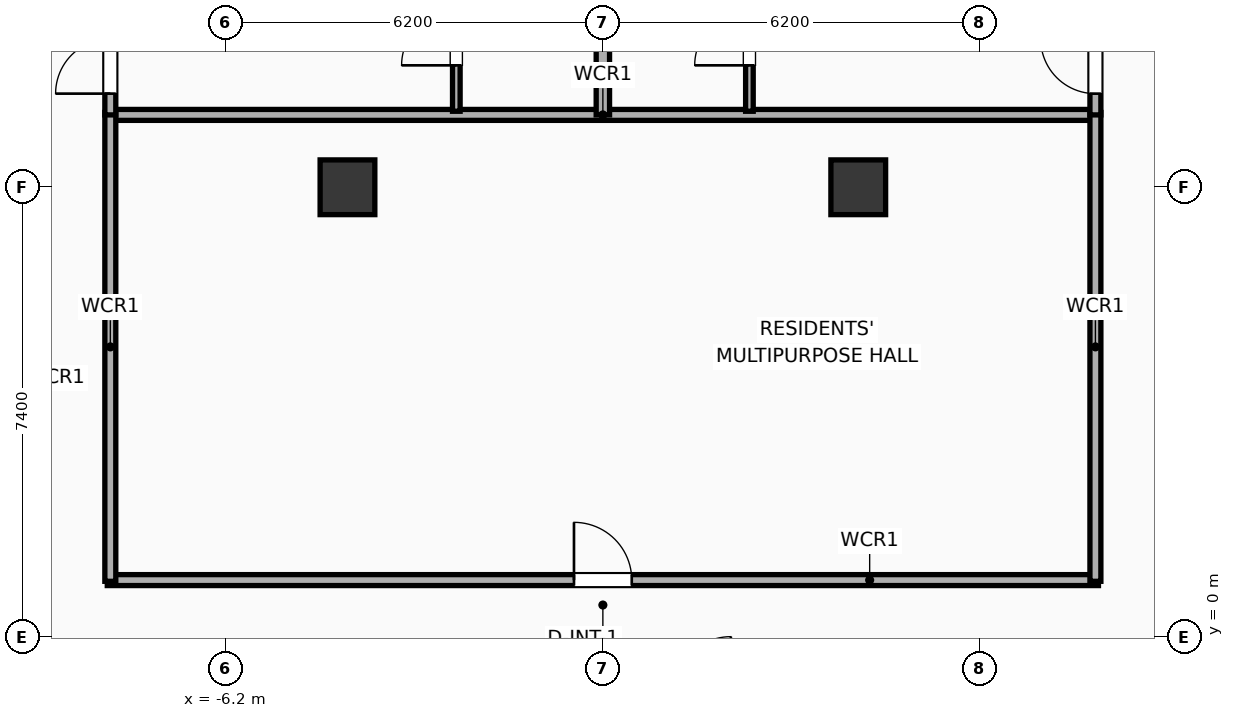
"""IFC4 building model, lengths in metres.
Left out: names, types, materials, properties, quantities, classifications, styles, units other than length and angle.
Written with IfcOpenShell. Run it as: python <this file> out.ifc"""

import sys

from ifc_helpers import new_model, si_unit, direction, frame, frame_2d, origin, origin_2d, place, context, subcontext, project, spatial, rectangle, extrude, element, fill, save


model = new_model("IFC4")
c1 = context("Model", 3, precision=1e-05, world=origin(), true_north=direction((0.0, 1.0)))
c2 = subcontext(c1, "Body", "Model", "MODEL_VIEW")
j1 = project(units=[si_unit("LENGTHUNIT", "METRE"), si_unit("PLANEANGLEUNIT", "RADIAN")], contexts=[c1])
p1 = place(None, origin())
s1 = spatial("IfcSite", under=j1, at=p1, CompositionType="ELEMENT")
p2 = place(p1, origin())
s2 = spatial("IfcBuilding", under=s1, at=p2, CompositionType="ELEMENT")
p3 = place(p2, frame((0.0, 0.0, 167.7)))
s3 = spatial("IfcBuildingStorey", under=s2, at=p3, CompositionType="ELEMENT", Elevation=167.7)
for number, where, z_axis, x_axis in (
    (1, (-4.2, 7.4, 0.0), (0.0, 0.0, 1.0), (1.0, 0.0, 0.0)),
    (2, (4.2, 7.4, 0.0), (0.0, 0.0, 1.0), (1.0, 0.0, 0.0)),
):
    element("IfcColumn", number, at=place(p3, frame(where, z_axis=z_axis, x_axis=x_axis)), inside=s3, PredefinedType="COLUMN", context=c2, shape_type="SweptSolid", body=[
        extrude(rectangle(XDim=0.9, YDim=0.9, at=origin_2d()), origin(), (0.0, 0.0, 1.0), 3.9),
    ])
p4 = place(p3, frame((-8.15, 8.59, 0.0), z_axis=(0.0, 0.0, 1.0), x_axis=(1.0, 0.0, 0.0)))
e3 = element("IfcWall", 3, at=p4, inside=s3, PredefinedType="PARTITIONING", context=c2, shape_type="SweptSolid", body=[
    extrude(rectangle(XDim=16.3, YDim=0.18, at=frame_2d((8.15, 0.0))), origin(), (0.0, 0.0, 1.0), 3.65),
])
p5 = place(p3, frame((-8.15, 0.94, 0.0), z_axis=(0.0, 0.0, 1.0), x_axis=(1.0, 0.0, 0.0)))
e4 = element("IfcWall", 4, at=p5, inside=s3, PredefinedType="PARTITIONING", context=c2, shape_type="SweptSolid", body=[
    extrude(rectangle(XDim=16.3, YDim=0.18, at=frame_2d((8.15, 0.0))), origin(), (0.0, 0.0, 1.0), 3.65),
])
p6 = place(p5, frame((7.675, 0.0, 0.0)))
e5 = element("IfcOpeningElement", 5, at=p6, cuts=e4, PredefinedType="OPENING", context=c2, shape_type="SweptSolid", body=[
    extrude(rectangle(XDim=0.95, YDim=2.05, at=frame_2d((0.475, 1.025))), frame((0.0, 0.1, 0.0), z_axis=(0.0, -1.0, 0.0), x_axis=(1.0, 0.0, 0.0)), (0.0, 0.0, 1.0), 0.2),
])
for number, where, z_axis, x_axis in (
    (6, (-8.1, 0.92, 0.0), (0.0, 0.0, 1.0), (0.0, 1.0, 0.0)),
    (7, (8.1, 0.92, 0.0), (0.0, 0.0, 1.0), (0.0, 1.0, 0.0)),
):
    element("IfcWall", number, at=place(p3, frame(where, z_axis=z_axis, x_axis=x_axis)), inside=s3, PredefinedType="PARTITIONING", context=c2, shape_type="SweptSolid", body=[
        extrude(rectangle(XDim=7.71, YDim=0.18, at=frame_2d((3.855, 0.0))), origin(), (0.0, 0.0, 1.0), 3.65),
    ])
p7 = place(p3, frame((-2.41, 8.65, 0.0), z_axis=(0.0, 0.0, 1.0), x_axis=(0.0, 1.0, 0.0)))
e8 = element("IfcWall", 8, at=p7, inside=s3, PredefinedType="PARTITIONING", context=c2, shape_type="SweptSolid", body=[
    extrude(rectangle(XDim=2.41, YDim=0.125, at=frame_2d((1.205, 0.0))), origin(), (0.0, 0.0, 1.0), 3.65),
])
p8 = place(p7, frame((0.755, 0.0, 0.0)))
e9 = element("IfcOpeningElement", 9, at=p8, cuts=e8, PredefinedType="OPENING", context=c2, shape_type="SweptSolid", body=[
    extrude(rectangle(XDim=0.9, YDim=2.05, at=frame_2d((0.45, 1.025))), frame((0.0, 0.073, 0.0), z_axis=(0.0, -1.0, 0.0), x_axis=(1.0, 0.0, 0.0)), (0.0, 0.0, 1.0), 0.145),
])
p9 = place(p3, frame((-8.1, 8.59, 0.0), z_axis=(0.0, 0.0, 1.0), x_axis=(0.0, 1.0, 0.0)))
e10 = element("IfcWall", 10, at=p9, inside=s3, PredefinedType="PARTITIONING", context=c2, shape_type="SweptSolid", body=[
    extrude(rectangle(XDim=10.636, YDim=0.18, at=frame_2d((5.318, 0.0))), origin(), (0.0, 0.0, 1.0), 3.65),
])
p10 = place(p9, frame((0.35, 0.0, 0.0)))
e11 = element("IfcOpeningElement", 11, at=p10, cuts=e10, PredefinedType="OPENING", context=c2, shape_type="SweptSolid", body=[
    extrude(rectangle(XDim=0.9, YDim=2.05, at=frame_2d((0.45, 1.025))), frame((0.0, 0.1, 0.0), z_axis=(0.0, -1.0, 0.0), x_axis=(1.0, 0.0, 0.0)), (0.0, 0.0, 1.0), 0.2),
])
p11 = place(p3, frame((2.41, 8.65, 0.0), z_axis=(0.0, 0.0, 1.0), x_axis=(0.0, 1.0, 0.0)))
e12 = element("IfcWall", 12, at=p11, inside=s3, PredefinedType="PARTITIONING", context=c2, shape_type="SweptSolid", body=[
    extrude(rectangle(XDim=2.41, YDim=0.125, at=frame_2d((1.205, 0.0))), origin(), (0.0, 0.0, 1.0), 3.65),
])
p12 = place(p11, frame((0.755, 0.0, 0.0)))
e13 = element("IfcOpeningElement", 13, at=p12, cuts=e12, PredefinedType="OPENING", context=c2, shape_type="SweptSolid", body=[
    extrude(rectangle(XDim=0.9, YDim=2.05, at=frame_2d((0.45, 1.025))), frame((0.0, 0.073, 0.0), z_axis=(0.0, -1.0, 0.0), x_axis=(1.0, 0.0, 0.0)), (0.0, 0.0, 1.0), 0.145),
])
p13 = place(p3, frame((8.1, 8.59, 0.0), z_axis=(0.0, 0.0, 1.0), x_axis=(0.0, 1.0, 0.0)))
e14 = element("IfcWall", 14, at=p13, inside=s3, PredefinedType="PARTITIONING", context=c2, shape_type="SweptSolid", body=[
    extrude(rectangle(XDim=12.339, YDim=0.18, at=frame_2d((6.169, 0.0))), origin(), (0.0, 0.0, 1.0), 3.65),
])
p14 = place(p13, frame((0.35, 0.0, 0.0)))
e15 = element("IfcOpeningElement", 15, at=p14, cuts=e14, PredefinedType="OPENING", context=c2, shape_type="SweptSolid", body=[
    extrude(rectangle(XDim=0.9, YDim=2.05, at=frame_2d((0.45, 1.025))), frame((0.0, 0.1, 0.0), z_axis=(0.0, -1.0, 0.0), x_axis=(1.0, 0.0, 0.0)), (0.0, 0.0, 1.0), 0.2),
])
p15 = place(p3, frame((0.0, 8.59, 0.0), z_axis=(0.0, 0.0, 1.0), x_axis=(0.0, 1.0, 0.0)))
e16 = element("IfcWall", 16, at=p15, inside=s3, PredefinedType="PARTITIONING", context=c2, shape_type="SweptSolid", body=[
    extrude(rectangle(XDim=11.488, YDim=0.22, at=frame_2d((5.744, 0.0))), origin(), (0.0, 0.0, 1.0), 3.04),
])
p16 = place(p6, origin())
e17 = element("IfcDoor", 17, at=p16, inside=s3, OperationType="SINGLE_SWING_LEFT", PredefinedType="DOOR", context=c2, shape_type="SweptSolid", body=[
    extrude(rectangle(XDim=0.95, YDim=2.05, at=frame_2d((0.475, 1.025))), frame((0.0, 0.025, 0.0), z_axis=(0.0, -1.0, 0.0), x_axis=(1.0, 0.0, 0.0)), (0.0, 0.0, 1.0), 0.05),
])
fill(e5, e17)
p17 = place(p8, origin())
e18 = element("IfcDoor", 18, at=p17, inside=s3, OperationType="SINGLE_SWING_LEFT", PredefinedType="DOOR", context=c2, shape_type="SweptSolid", body=[
    extrude(rectangle(XDim=0.9, YDim=2.05, at=frame_2d((0.45, 1.025))), frame((0.0, 0.025, 0.0), z_axis=(0.0, -1.0, 0.0), x_axis=(1.0, 0.0, 0.0)), (0.0, 0.0, 1.0), 0.05),
])
fill(e9, e18)
p18 = place(p10, origin())
e19 = element("IfcDoor", 19, at=p18, inside=s3, OperationType="SINGLE_SWING_LEFT", PredefinedType="DOOR", context=c2, shape_type="SweptSolid", body=[
    extrude(rectangle(XDim=0.9, YDim=2.05, at=frame_2d((0.45, 1.025))), frame((0.0, 0.025, 0.0), z_axis=(0.0, -1.0, 0.0), x_axis=(1.0, 0.0, 0.0)), (0.0, 0.0, 1.0), 0.05),
])
fill(e11, e19)
p19 = place(p12, origin())
e20 = element("IfcDoor", 20, at=p19, inside=s3, OperationType="SINGLE_SWING_LEFT", PredefinedType="DOOR", context=c2, shape_type="SweptSolid", body=[
    extrude(rectangle(XDim=0.9, YDim=2.05, at=frame_2d((0.45, 1.025))), frame((0.0, 0.025, 0.0), z_axis=(0.0, -1.0, 0.0), x_axis=(1.0, 0.0, 0.0)), (0.0, 0.0, 1.0), 0.05),
])
fill(e13, e20)
p20 = place(p14, origin())
e21 = element("IfcDoor", 21, at=p20, inside=s3, OperationType="SINGLE_SWING_RIGHT", PredefinedType="DOOR", context=c2, shape_type="SweptSolid", body=[
    extrude(rectangle(XDim=0.9, YDim=2.05, at=frame_2d((0.45, 1.025))), frame((0.0, 0.025, 0.0), z_axis=(0.0, -1.0, 0.0), x_axis=(1.0, 0.0, 0.0)), (0.0, 0.0, 1.0), 0.05),
])
fill(e15, e21)
save(model, sys.argv[1])
